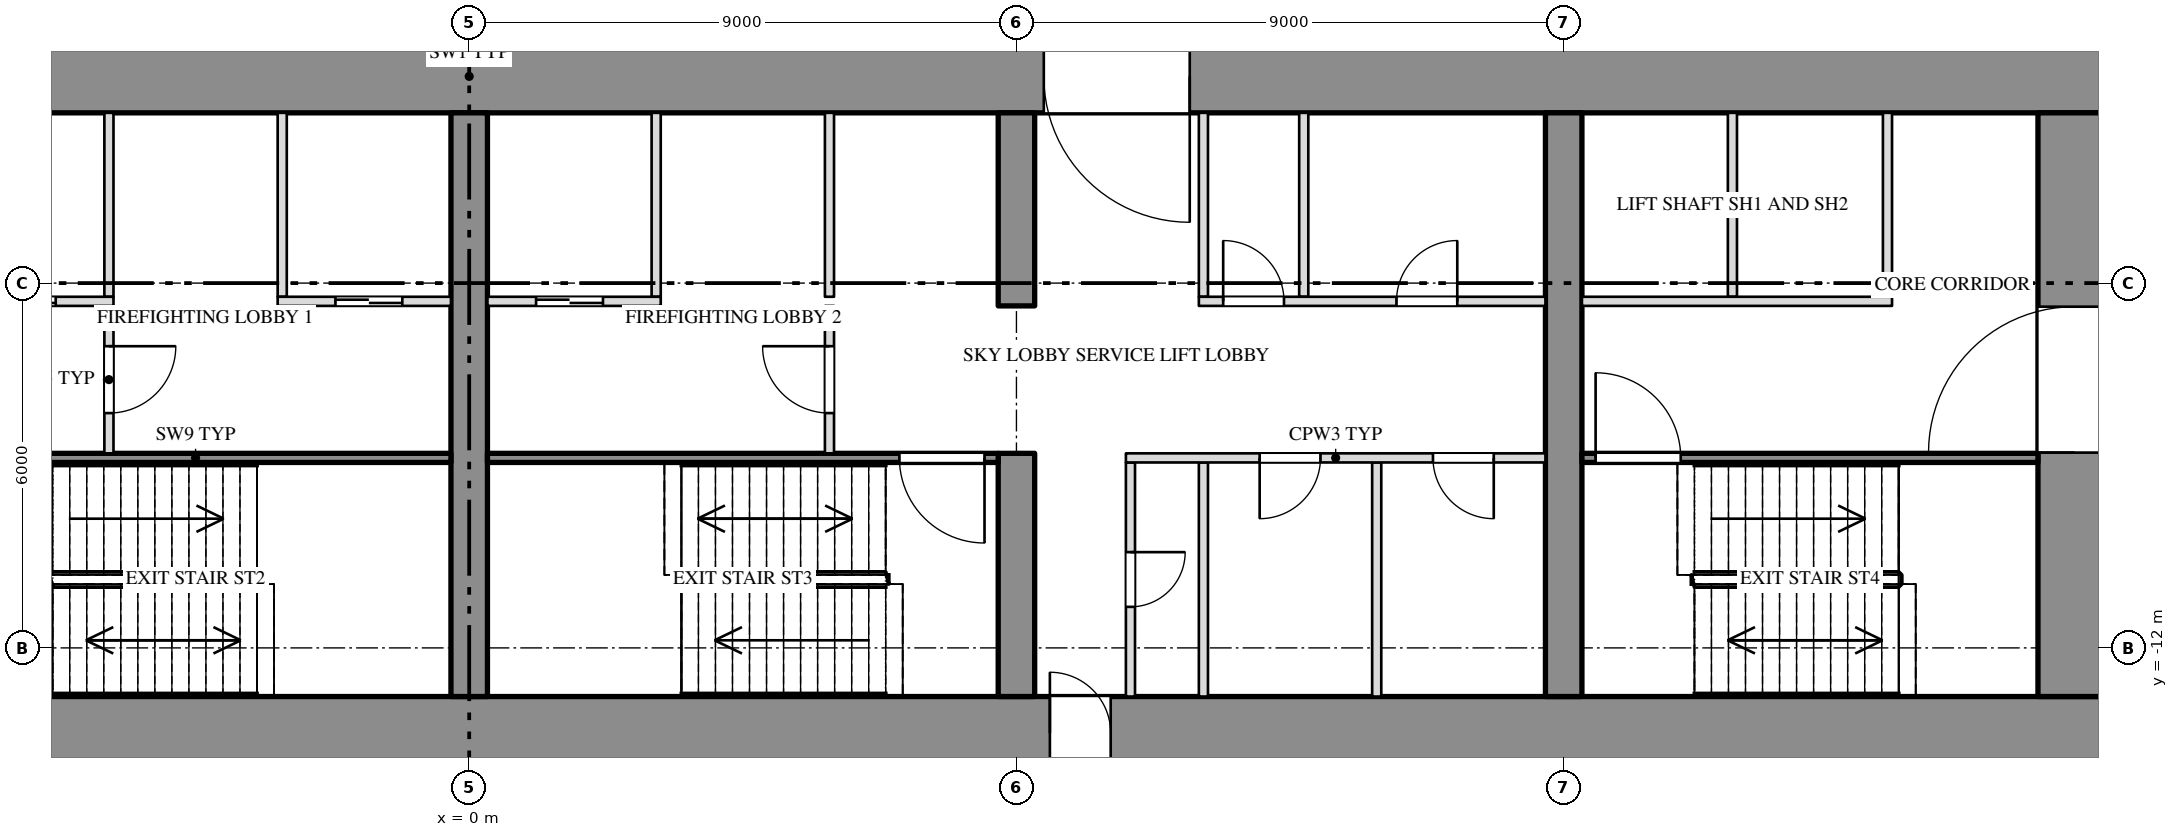
"""IFC4 building model, lengths in metres.
Left out: names, types, materials, properties, quantities, classifications, styles, units other than length and angle.
Written with IfcOpenShell. Run it as: python <this file> out.ifc"""

import sys

from ifc_helpers import new_model, si_unit, direction, frame, frame_2d, origin, place, context, subcontext, project, spatial, rectangle, extrude, element, fill, save


model = new_model("IFC4")
c1 = context("Model", 3, precision=1e-05, world=origin(), true_north=direction((0.0, 1.0)))
c2 = subcontext(c1, "Body", "Model", "MODEL_VIEW")
j1 = project(units=[si_unit("LENGTHUNIT", "METRE"), si_unit("PLANEANGLEUNIT", "RADIAN")], contexts=[c1])
p1 = place(None, origin())
s1 = spatial("IfcSite", under=j1, at=p1, CompositionType="ELEMENT")
p2 = place(p1, origin())
s2 = spatial("IfcBuilding", under=s1, at=p2, CompositionType="ELEMENT")
p3 = place(p2, frame((0.0, 0.0, 100.5)))
s3 = spatial("IfcBuildingStorey", under=s2, at=p3, CompositionType="ELEMENT", Elevation=100.5)
p4 = place(p3, frame((-27.0, -2.6, 0.0), z_axis=(0.0, 0.0, 1.0), x_axis=(1.0, 0.0, 0.0)))
e1 = element("IfcWall", 1, at=p4, inside=s3, PredefinedType="SHEAR", context=c2, shape_type="SweptSolid", body=[
    extrude(rectangle(XDim=54.0, YDim=1.2, at=frame_2d((27.0, 0.0))), origin(), (0.0, 0.0, 1.0), 3.65),
])
p5 = place(p4, frame((15.15, 0.0, 0.0)))
e2 = element("IfcOpeningElement", 2, at=p5, cuts=e1, PredefinedType="OPENING", context=c2, shape_type="SweptSolid", body=[
    extrude(rectangle(XDim=2.4, YDim=2.1, at=frame_2d((1.2, 1.05))), frame((0.0, 0.612, 0.0), z_axis=(0.0, -1.0, 0.0), x_axis=(1.0, 0.0, 0.0)), (0.0, 0.0, 1.0), 1.224),
])
p6 = place(p4, frame((36.45, 0.0, 0.0)))
e3 = element("IfcOpeningElement", 3, at=p6, cuts=e1, PredefinedType="OPENING", context=c2, shape_type="SweptSolid", body=[
    extrude(rectangle(XDim=2.4, YDim=2.1, at=frame_2d((1.2, 1.05))), frame((0.0, 0.612, 0.0), z_axis=(0.0, -1.0, 0.0), x_axis=(1.0, 0.0, 0.0)), (0.0, 0.0, 1.0), 1.224),
])
p7 = place(p3, frame((-27.0, -13.4, 0.0), z_axis=(0.0, 0.0, 1.0), x_axis=(1.0, 0.0, 0.0)))
e4 = element("IfcWall", 4, at=p7, inside=s3, PredefinedType="SHEAR", context=c2, shape_type="SweptSolid", body=[
    extrude(rectangle(XDim=54.0, YDim=1.2, at=frame_2d((27.0, 0.0))), origin(), (0.0, 0.0, 1.0), 3.65),
])
p8 = place(p7, frame((16.45, 0.0, 0.0)))
e5 = element("IfcOpeningElement", 5, at=p8, cuts=e4, PredefinedType="OPENING", context=c2, shape_type="SweptSolid", body=[
    extrude(rectangle(XDim=1.0, YDim=2.1, at=frame_2d((0.5, 1.05))), frame((0.0, 0.612, 0.0), z_axis=(0.0, -1.0, 0.0), x_axis=(1.0, 0.0, 0.0)), (0.0, 0.0, 1.0), 1.224),
])
p9 = place(p7, frame((36.55, 0.0, 0.0)))
e6 = element("IfcOpeningElement", 6, at=p9, cuts=e4, PredefinedType="OPENING", context=c2, shape_type="SweptSolid", body=[
    extrude(rectangle(XDim=1.0, YDim=2.1, at=frame_2d((0.5, 1.05))), frame((0.0, 0.612, 0.0), z_axis=(0.0, -1.0, 0.0), x_axis=(1.0, 0.0, 0.0)), (0.0, 0.0, 1.0), 1.224),
])
p10 = place(p3, frame((26.4, -12.8, 0.0), z_axis=(0.0, 0.0, 1.0), x_axis=(0.0, 1.0, 0.0)))
e7 = element("IfcWall", 7, at=p10, inside=s3, PredefinedType="SHEAR", context=c2, shape_type="SweptSolid", body=[
    extrude(rectangle(XDim=9.6, YDim=1.2, at=frame_2d((4.8, 0.0))), origin(), (0.0, 0.0, 1.0), 3.65),
])
p11 = place(p10, frame((4.012, 0.0, 0.0)))
e8 = element("IfcOpeningElement", 8, at=p11, cuts=e7, PredefinedType="OPENING", context=c2, shape_type="SweptSolid", body=[
    extrude(rectangle(XDim=2.4, YDim=2.1, at=frame_2d((1.2, 1.05))), frame((0.0, 0.612, 0.0), z_axis=(0.0, -1.0, 0.0), x_axis=(1.0, 0.0, 0.0)), (0.0, 0.0, 1.0), 1.224),
])
p12 = place(p3, frame((0.0, -12.8, 0.0), z_axis=(0.0, 0.0, 1.0), x_axis=(0.0, 1.0, 0.0)))
e9 = element("IfcWall", 9, at=p12, inside=s3, PredefinedType="SHEAR", context=c2, shape_type="SweptSolid", body=[
    extrude(rectangle(XDim=9.6, YDim=0.6, at=frame_2d((4.8, 0.0))), origin(), (0.0, 0.0, 1.0), 3.65),
])
p13 = place(p3, frame((9.0, -12.8, 0.0), z_axis=(0.0, 0.0, 1.0), x_axis=(0.0, 1.0, 0.0)))
e10 = element("IfcWall", 10, at=p13, inside=s3, PredefinedType="SHEAR", context=c2, shape_type="SweptSolid", body=[
    extrude(rectangle(XDim=4.0, YDim=0.6, at=frame_2d((2.0, 0.0))), origin(), (0.0, 0.0, 1.0), 3.65),
])
p14 = place(p3, frame((9.0, -6.375, 0.0), z_axis=(0.0, 0.0, 1.0), x_axis=(0.0, 1.0, 0.0)))
e11 = element("IfcWall", 11, at=p14, inside=s3, PredefinedType="SHEAR", context=c2, shape_type="SweptSolid", body=[
    extrude(rectangle(XDim=3.175, YDim=0.6, at=frame_2d((1.587, 0.0))), origin(), (0.0, 0.0, 1.0), 3.65),
])
p15 = place(p3, frame((18.0, -12.8, 0.0), z_axis=(0.0, 0.0, 1.0), x_axis=(0.0, 1.0, 0.0)))
e12 = element("IfcWall", 12, at=p15, inside=s3, PredefinedType="SHEAR", context=c2, shape_type="SweptSolid", body=[
    extrude(rectangle(XDim=9.6, YDim=0.6, at=frame_2d((4.8, 0.0))), origin(), (0.0, 0.0, 1.0), 3.65),
])
for number, where, z_axis, x_axis in (
    (13, (-3.075, -6.225, 0.0), (0.0, 0.0, 1.0), (0.0, 1.0, 0.0)),
    (14, (-5.925, -6.225, 0.0), (0.0, 0.0, 1.0), (0.0, 1.0, 0.0)),
    (15, (3.075, -6.225, 0.0), (0.0, 0.0, 1.0), (0.0, 1.0, 0.0)),
    (16, (5.925, -6.225, 0.0), (0.0, 0.0, 1.0), (0.0, 1.0, 0.0)),
    (17, (12.075, -6.225, 0.0), (0.0, 0.0, 1.0), (0.0, 1.0, 0.0)),
    (18, (13.725, -6.225, 0.0), (0.0, 0.0, 1.0), (0.0, 1.0, 0.0)),
    (19, (20.775, -6.225, 0.0), (0.0, 0.0, 1.0), (0.0, 1.0, 0.0)),
    (20, (23.325, -6.225, 0.0), (0.0, 0.0, 1.0), (0.0, 1.0, 0.0)),
):
    element("IfcWall", number, at=place(p3, frame(where, z_axis=z_axis, x_axis=x_axis)), inside=s3, PredefinedType="PARTITIONING", context=c2, shape_type="SweptSolid", body=[
        extrude(rectangle(XDim=3.025, YDim=0.15, at=frame_2d((1.513, 0.0))), origin(), (0.0, 0.0, 1.0), 3.65),
    ])
p16 = place(p3, frame((10.875, -12.8, 0.0), z_axis=(0.0, 0.0, 1.0), x_axis=(0.0, 1.0, 0.0)))
e21 = element("IfcWall", 21, at=p16, inside=s3, PredefinedType="PARTITIONING", context=c2, shape_type="SweptSolid", body=[
    extrude(rectangle(XDim=3.85, YDim=0.15, at=frame_2d((1.925, 0.0))), origin(), (0.0, 0.0, 1.0), 3.65),
])
p17 = place(p16, frame((1.475, 0.0, 0.0)))
e22 = element("IfcOpeningElement", 22, at=p17, cuts=e21, PredefinedType="OPENING", context=c2, shape_type="SweptSolid", body=[
    extrude(rectangle(XDim=0.9, YDim=2.1, at=frame_2d((0.45, 1.05))), frame((0.0, 0.087, 0.0), z_axis=(0.0, -1.0, 0.0), x_axis=(1.0, 0.0, 0.0)), (0.0, 0.0, 1.0), 0.174),
])
for number, where, z_axis, x_axis in (
    (23, (12.075, -12.8, 0.0), (0.0, 0.0, 1.0), (0.0, 1.0, 0.0)),
    (24, (14.925, -12.8, 0.0), (0.0, 0.0, 1.0), (0.0, 1.0, 0.0)),
):
    element("IfcWall", number, at=place(p3, frame(where, z_axis=z_axis, x_axis=x_axis)), inside=s3, PredefinedType="PARTITIONING", context=c2, shape_type="SweptSolid", body=[
        extrude(rectangle(XDim=3.85, YDim=0.15, at=frame_2d((1.925, 0.0))), origin(), (0.0, 0.0, 1.0), 3.65),
    ])
p18 = place(p3, frame((-5.925, -8.8, 0.0), z_axis=(0.0, 0.0, 1.0), x_axis=(0.0, 1.0, 0.0)))
e25 = element("IfcWall", 25, at=p18, inside=s3, PredefinedType="PARTITIONING", context=c2, shape_type="SweptSolid", body=[
    extrude(rectangle(XDim=2.425, YDim=0.15, at=frame_2d((1.212, 0.0))), origin(), (0.0, 0.0, 1.0), 3.65),
])
p19 = place(p18, frame((0.662, 0.0, 0.0)))
e26 = element("IfcOpeningElement", 26, at=p19, cuts=e25, PredefinedType="OPENING", context=c2, shape_type="SweptSolid", body=[
    extrude(rectangle(XDim=1.1, YDim=2.1, at=frame_2d((0.55, 1.05))), frame((0.0, 0.087, 0.0), z_axis=(0.0, -1.0, 0.0), x_axis=(1.0, 0.0, 0.0)), (0.0, 0.0, 1.0), 0.174),
])
p20 = place(p3, frame((5.925, -8.8, 0.0), z_axis=(0.0, 0.0, 1.0), x_axis=(0.0, 1.0, 0.0)))
e27 = element("IfcWall", 27, at=p20, inside=s3, PredefinedType="PARTITIONING", context=c2, shape_type="SweptSolid", body=[
    extrude(rectangle(XDim=2.425, YDim=0.15, at=frame_2d((1.212, 0.0))), origin(), (0.0, 0.0, 1.0), 3.65),
])
p21 = place(p20, frame((0.662, 0.0, 0.0)))
e28 = element("IfcOpeningElement", 28, at=p21, cuts=e27, PredefinedType="OPENING", context=c2, shape_type="SweptSolid", body=[
    extrude(rectangle(XDim=1.1, YDim=2.1, at=frame_2d((0.55, 1.05))), frame((0.0, 0.087, 0.0), z_axis=(0.0, -1.0, 0.0), x_axis=(1.0, 0.0, 0.0)), (0.0, 0.0, 1.0), 0.174),
])
p22 = place(p3, frame((-8.7, -6.3, 0.0), z_axis=(0.0, 0.0, 1.0), x_axis=(1.0, 0.0, 0.0)))
e29 = element("IfcWall", 29, at=p22, inside=s3, PredefinedType="PARTITIONING", context=c2, shape_type="SweptSolid", body=[
    extrude(rectangle(XDim=2.85, YDim=0.15, at=frame_2d((1.425, 0.0))), origin(), (0.0, 0.0, 1.0), 3.65),
])
p23 = place(p22, frame((0.8, 0.0, 0.0)))
e30 = element("IfcOpeningElement", 30, at=p23, cuts=e29, PredefinedType="OPENING", context=c2, shape_type="SweptSolid", body=[
    extrude(rectangle(XDim=1.1, YDim=2.1, at=frame_2d((0.55, 1.05))), frame((0.0, 0.087, 0.0), z_axis=(0.0, -1.0, 0.0), x_axis=(1.0, 0.0, 0.0)), (0.0, 0.0, 1.0), 0.174),
])
p24 = place(p3, frame((-3.15, -6.3, 0.0), z_axis=(0.0, 0.0, 1.0), x_axis=(1.0, 0.0, 0.0)))
e31 = element("IfcWall", 31, at=p24, inside=s3, PredefinedType="PARTITIONING", context=c2, shape_type="SweptSolid", body=[
    extrude(rectangle(XDim=2.85, YDim=0.15, at=frame_2d((1.425, 0.0))), origin(), (0.0, 0.0, 1.0), 3.65),
])
p25 = place(p24, frame((0.95, 0.0, 0.0)))
e32 = element("IfcOpeningElement", 32, at=p25, cuts=e31, PredefinedType="OPENING", context=c2, shape_type="SweptSolid", body=[
    extrude(rectangle(XDim=1.1, YDim=2.1, at=frame_2d((0.55, 1.05))), frame((0.0, 0.087, 0.0), z_axis=(0.0, -1.0, 0.0), x_axis=(1.0, 0.0, 0.0)), (0.0, 0.0, 1.0), 0.174),
])
p26 = place(p3, frame((0.3, -6.3, 0.0), z_axis=(0.0, 0.0, 1.0), x_axis=(1.0, 0.0, 0.0)))
e33 = element("IfcWall", 33, at=p26, inside=s3, PredefinedType="PARTITIONING", context=c2, shape_type="SweptSolid", body=[
    extrude(rectangle(XDim=2.85, YDim=0.15, at=frame_2d((1.425, 0.0))), origin(), (0.0, 0.0, 1.0), 3.65),
])
p27 = place(p26, frame((0.8, 0.0, 0.0)))
e34 = element("IfcOpeningElement", 34, at=p27, cuts=e33, PredefinedType="OPENING", context=c2, shape_type="SweptSolid", body=[
    extrude(rectangle(XDim=1.1, YDim=2.1, at=frame_2d((0.55, 1.05))), frame((0.0, 0.087, 0.0), z_axis=(0.0, -1.0, 0.0), x_axis=(1.0, 0.0, 0.0)), (0.0, 0.0, 1.0), 0.174),
])
p28 = place(p3, frame((12.0, -6.3, 0.0), z_axis=(0.0, 0.0, 1.0), x_axis=(1.0, 0.0, 0.0)))
e35 = element("IfcWall", 35, at=p28, inside=s3, PredefinedType="PARTITIONING", context=c2, shape_type="SweptSolid", body=[
    extrude(rectangle(XDim=5.7, YDim=0.15, at=frame_2d((2.85, 0.0))), origin(), (0.0, 0.0, 1.0), 3.65),
])
p29 = place(p28, frame((0.4, 0.0, 0.0)))
e36 = element("IfcOpeningElement", 36, at=p29, cuts=e35, PredefinedType="OPENING", context=c2, shape_type="SweptSolid", body=[
    extrude(rectangle(XDim=1.0, YDim=2.1, at=frame_2d((0.5, 1.05))), frame((0.0, 0.087, 0.0), z_axis=(0.0, -1.0, 0.0), x_axis=(1.0, 0.0, 0.0)), (0.0, 0.0, 1.0), 0.174),
])
p30 = place(p28, frame((3.25, 0.0, 0.0)))
e37 = element("IfcOpeningElement", 37, at=p30, cuts=e35, PredefinedType="OPENING", context=c2, shape_type="SweptSolid", body=[
    extrude(rectangle(XDim=1.0, YDim=2.1, at=frame_2d((0.5, 1.05))), frame((0.0, 0.087, 0.0), z_axis=(0.0, -1.0, 0.0), x_axis=(1.0, 0.0, 0.0)), (0.0, 0.0, 1.0), 0.174),
])
p31 = place(p3, frame((18.3, -6.3, 0.0), z_axis=(0.0, 0.0, 1.0), x_axis=(1.0, 0.0, 0.0)))
e38 = element("IfcWall", 38, at=p31, inside=s3, PredefinedType="PARTITIONING", context=c2, shape_type="SweptSolid", body=[
    extrude(rectangle(XDim=5.1, YDim=0.15, at=frame_2d((2.55, 0.0))), origin(), (0.0, 0.0, 1.0), 3.65),
])
p32 = place(p3, frame((-8.7, -8.875, 0.0), z_axis=(0.0, 0.0, 1.0), x_axis=(1.0, 0.0, 0.0)))
e39 = element("IfcWall", 39, at=p32, inside=s3, PredefinedType="SHEAR", context=c2, shape_type="SweptSolid", body=[
    extrude(rectangle(XDim=8.4, YDim=0.15, at=frame_2d((4.2, 0.0))), origin(), (0.0, 0.0, 1.0), 3.65),
])
p33 = place(p32, frame((0.225, 0.0, 0.0)))
e40 = element("IfcOpeningElement", 40, at=p33, cuts=e39, PredefinedType="OPENING", context=c2, shape_type="SweptSolid", body=[
    extrude(rectangle(XDim=1.4, YDim=2.1, at=frame_2d((0.7, 1.05))), frame((0.0, 0.087, 0.0), z_axis=(0.0, -1.0, 0.0), x_axis=(1.0, 0.0, 0.0)), (0.0, 0.0, 1.0), 0.174),
])
p34 = place(p3, frame((0.3, -8.875, 0.0), z_axis=(0.0, 0.0, 1.0), x_axis=(1.0, 0.0, 0.0)))
e41 = element("IfcWall", 41, at=p34, inside=s3, PredefinedType="SHEAR", context=c2, shape_type="SweptSolid", body=[
    extrude(rectangle(XDim=8.4, YDim=0.15, at=frame_2d((4.2, 0.0))), origin(), (0.0, 0.0, 1.0), 3.65),
])
p35 = place(p34, frame((6.775, 0.0, 0.0)))
e42 = element("IfcOpeningElement", 42, at=p35, cuts=e41, PredefinedType="OPENING", context=c2, shape_type="SweptSolid", body=[
    extrude(rectangle(XDim=1.4, YDim=2.1, at=frame_2d((0.7, 1.05))), frame((0.0, 0.087, 0.0), z_axis=(0.0, -1.0, 0.0), x_axis=(1.0, 0.0, 0.0)), (0.0, 0.0, 1.0), 0.174),
])
p36 = place(p3, frame((10.8, -8.875, 0.0), z_axis=(0.0, 0.0, 1.0), x_axis=(1.0, 0.0, 0.0)))
e43 = element("IfcWall", 43, at=p36, inside=s3, PredefinedType="PARTITIONING", context=c2, shape_type="SweptSolid", body=[
    extrude(rectangle(XDim=6.9, YDim=0.15, at=frame_2d((3.45, 0.0))), origin(), (0.0, 0.0, 1.0), 3.65),
])
p37 = place(p36, frame((2.2, 0.0, 0.0)))
e44 = element("IfcOpeningElement", 44, at=p37, cuts=e43, PredefinedType="OPENING", context=c2, shape_type="SweptSolid", body=[
    extrude(rectangle(XDim=1.0, YDim=2.1, at=frame_2d((0.5, 1.05))), frame((0.0, 0.087, 0.0), z_axis=(0.0, -1.0, 0.0), x_axis=(1.0, 0.0, 0.0)), (0.0, 0.0, 1.0), 0.174),
])
p38 = place(p36, frame((5.05, 0.0, 0.0)))
e45 = element("IfcOpeningElement", 45, at=p38, cuts=e43, PredefinedType="OPENING", context=c2, shape_type="SweptSolid", body=[
    extrude(rectangle(XDim=1.0, YDim=2.1, at=frame_2d((0.5, 1.05))), frame((0.0, 0.087, 0.0), z_axis=(0.0, -1.0, 0.0), x_axis=(1.0, 0.0, 0.0)), (0.0, 0.0, 1.0), 0.174),
])
p39 = place(p3, frame((18.3, -8.875, 0.0), z_axis=(0.0, 0.0, 1.0), x_axis=(1.0, 0.0, 0.0)))
e46 = element("IfcWall", 46, at=p39, inside=s3, PredefinedType="SHEAR", context=c2, shape_type="SweptSolid", body=[
    extrude(rectangle(XDim=7.5, YDim=0.15, at=frame_2d((3.75, 0.0))), origin(), (0.0, 0.0, 1.0), 3.65),
])
p40 = place(p39, frame((0.225, 0.0, 0.0)))
e47 = element("IfcOpeningElement", 47, at=p40, cuts=e46, PredefinedType="OPENING", context=c2, shape_type="SweptSolid", body=[
    extrude(rectangle(XDim=1.4, YDim=2.1, at=frame_2d((0.7, 1.05))), frame((0.0, 0.087, 0.0), z_axis=(0.0, -1.0, 0.0), x_axis=(1.0, 0.0, 0.0)), (0.0, 0.0, 1.0), 0.174),
])
p41 = place(p23, origin())
e48 = element("IfcDoor", 48, at=p41, inside=s3, OperationType="SLIDING_TO_RIGHT", PredefinedType="DOOR", context=c2, shape_type="SweptSolid", body=[
    extrude(rectangle(XDim=1.1, YDim=2.1, at=frame_2d((0.55, 1.05))), frame((0.0, 0.025, 0.0), z_axis=(0.0, -1.0, 0.0), x_axis=(1.0, 0.0, 0.0)), (0.0, 0.0, 1.0), 0.05),
])
fill(e30, e48)
p42 = place(p19, origin())
e49 = element("IfcDoor", 49, at=p42, inside=s3, OperationType="SINGLE_SWING_LEFT", PredefinedType="DOOR", context=c2, shape_type="SweptSolid", body=[
    extrude(rectangle(XDim=1.1, YDim=2.1, at=frame_2d((0.55, 1.05))), frame((0.0, 0.025, 0.0), z_axis=(0.0, -1.0, 0.0), x_axis=(1.0, 0.0, 0.0)), (0.0, 0.0, 1.0), 0.05),
])
fill(e26, e49)
p43 = place(p25, origin())
e50 = element("IfcDoor", 50, at=p43, inside=s3, OperationType="SLIDING_TO_RIGHT", PredefinedType="DOOR", context=c2, shape_type="SweptSolid", body=[
    extrude(rectangle(XDim=1.1, YDim=2.1, at=frame_2d((0.55, 1.05))), frame((0.0, 0.025, 0.0), z_axis=(0.0, -1.0, 0.0), x_axis=(1.0, 0.0, 0.0)), (0.0, 0.0, 1.0), 0.05),
])
fill(e32, e50)
p44 = place(p27, origin())
e51 = element("IfcDoor", 51, at=p44, inside=s3, OperationType="SLIDING_TO_LEFT", PredefinedType="DOOR", context=c2, shape_type="SweptSolid", body=[
    extrude(rectangle(XDim=1.1, YDim=2.1, at=frame_2d((0.55, 1.05))), frame((0.0, 0.025, 0.0), z_axis=(0.0, -1.0, 0.0), x_axis=(1.0, 0.0, 0.0)), (0.0, 0.0, 1.0), 0.05),
])
fill(e34, e51)
p45 = place(p21, origin())
e52 = element("IfcDoor", 52, at=p45, inside=s3, OperationType="SINGLE_SWING_RIGHT", PredefinedType="DOOR", context=c2, shape_type="SweptSolid", body=[
    extrude(rectangle(XDim=1.1, YDim=2.1, at=frame_2d((0.55, 1.05))), frame((0.0, 0.025, 0.0), z_axis=(0.0, -1.0, 0.0), x_axis=(1.0, 0.0, 0.0)), (0.0, 0.0, 1.0), 0.05),
])
fill(e28, e52)
p46 = place(p35, origin())
e53 = element("IfcDoor", 53, at=p46, inside=s3, OperationType="DOUBLE_DOOR_SINGLE_SWING", PredefinedType="DOOR", context=c2, shape_type="SweptSolid", body=[
    extrude(rectangle(XDim=1.4, YDim=2.1, at=frame_2d((0.7, 1.05))), frame((0.0, 0.025, 0.0), z_axis=(0.0, -1.0, 0.0), x_axis=(1.0, 0.0, 0.0)), (0.0, 0.0, 1.0), 0.05),
])
fill(e42, e53)
p47 = place(p9, origin())
e54 = element("IfcDoor", 54, at=p47, inside=s3, OperationType="SINGLE_SWING_LEFT", PredefinedType="DOOR", context=c2, shape_type="SweptSolid", body=[
    extrude(rectangle(XDim=1.0, YDim=2.1, at=frame_2d((0.5, 1.05))), frame((0.0, 0.025, 0.0), z_axis=(0.0, -1.0, 0.0), x_axis=(1.0, 0.0, 0.0)), (0.0, 0.0, 1.0), 0.05),
])
fill(e6, e54)
p48 = place(p6, origin())
e55 = element("IfcDoor", 55, at=p48, inside=s3, OperationType="DOUBLE_DOOR_SINGLE_SWING", PredefinedType="DOOR", context=c2, shape_type="SweptSolid", body=[
    extrude(rectangle(XDim=2.4, YDim=2.1, at=frame_2d((1.2, 1.05))), frame((0.0, 0.025, 0.0), z_axis=(0.0, -1.0, 0.0), x_axis=(1.0, 0.0, 0.0)), (0.0, 0.0, 1.0), 0.05),
])
fill(e3, e55)
p49 = place(p17, origin())
e56 = element("IfcDoor", 56, at=p49, inside=s3, OperationType="SINGLE_SWING_LEFT", PredefinedType="DOOR", context=c2, shape_type="SweptSolid", body=[
    extrude(rectangle(XDim=0.9, YDim=2.1, at=frame_2d((0.45, 1.05))), frame((0.0, 0.025, 0.0), z_axis=(0.0, -1.0, 0.0), x_axis=(1.0, 0.0, 0.0)), (0.0, 0.0, 1.0), 0.05),
])
fill(e22, e56)
p50 = place(p29, origin())
e57 = element("IfcDoor", 57, at=p50, inside=s3, OperationType="SINGLE_SWING_LEFT", PredefinedType="DOOR", context=c2, shape_type="SweptSolid", body=[
    extrude(rectangle(XDim=1.0, YDim=2.1, at=frame_2d((0.5, 1.05))), frame((0.0, 0.025, 0.0), z_axis=(0.0, -1.0, 0.0), x_axis=(1.0, 0.0, 0.0)), (0.0, 0.0, 1.0), 0.05),
])
fill(e36, e57)
p51 = place(p37, origin())
e58 = element("IfcDoor", 58, at=p51, inside=s3, OperationType="SINGLE_SWING_RIGHT", PredefinedType="DOOR", context=c2, shape_type="SweptSolid", body=[
    extrude(rectangle(XDim=1.0, YDim=2.1, at=frame_2d((0.5, 1.05))), frame((0.0, 0.025, 0.0), z_axis=(0.0, -1.0, 0.0), x_axis=(1.0, 0.0, 0.0)), (0.0, 0.0, 1.0), 0.05),
])
fill(e44, e58)
p52 = place(p30, origin())
e59 = element("IfcDoor", 59, at=p52, inside=s3, OperationType="SINGLE_SWING_RIGHT", PredefinedType="DOOR", context=c2, shape_type="SweptSolid", body=[
    extrude(rectangle(XDim=1.0, YDim=2.1, at=frame_2d((0.5, 1.05))), frame((0.0, 0.025, 0.0), z_axis=(0.0, -1.0, 0.0), x_axis=(1.0, 0.0, 0.0)), (0.0, 0.0, 1.0), 0.05),
])
fill(e37, e59)
p53 = place(p38, origin())
e60 = element("IfcDoor", 60, at=p53, inside=s3, OperationType="SINGLE_SWING_LEFT", PredefinedType="DOOR", context=c2, shape_type="SweptSolid", body=[
    extrude(rectangle(XDim=1.0, YDim=2.1, at=frame_2d((0.5, 1.05))), frame((0.0, 0.025, 0.0), z_axis=(0.0, -1.0, 0.0), x_axis=(1.0, 0.0, 0.0)), (0.0, 0.0, 1.0), 0.05),
])
fill(e45, e60)
p54 = place(p40, origin())
e61 = element("IfcDoor", 61, at=p54, inside=s3, OperationType="DOUBLE_DOOR_SINGLE_SWING", PredefinedType="DOOR", context=c2, shape_type="SweptSolid", body=[
    extrude(rectangle(XDim=1.4, YDim=2.1, at=frame_2d((0.7, 1.05))), frame((0.0, 0.025, 0.0), z_axis=(0.0, -1.0, 0.0), x_axis=(1.0, 0.0, 0.0)), (0.0, 0.0, 1.0), 0.05),
])
fill(e47, e61)
p55 = place(p11, origin())
e62 = element("IfcDoor", 62, at=p55, inside=s3, OperationType="DOUBLE_DOOR_SINGLE_SWING", PredefinedType="DOOR", context=c2, shape_type="SweptSolid", body=[
    extrude(rectangle(XDim=2.4, YDim=2.1, at=frame_2d((1.2, 1.05))), frame((0.0, 0.025, 0.0), z_axis=(0.0, -1.0, 0.0), x_axis=(1.0, 0.0, 0.0)), (0.0, 0.0, 1.0), 0.05),
])
fill(e8, e62)
save(model, sys.argv[1])
